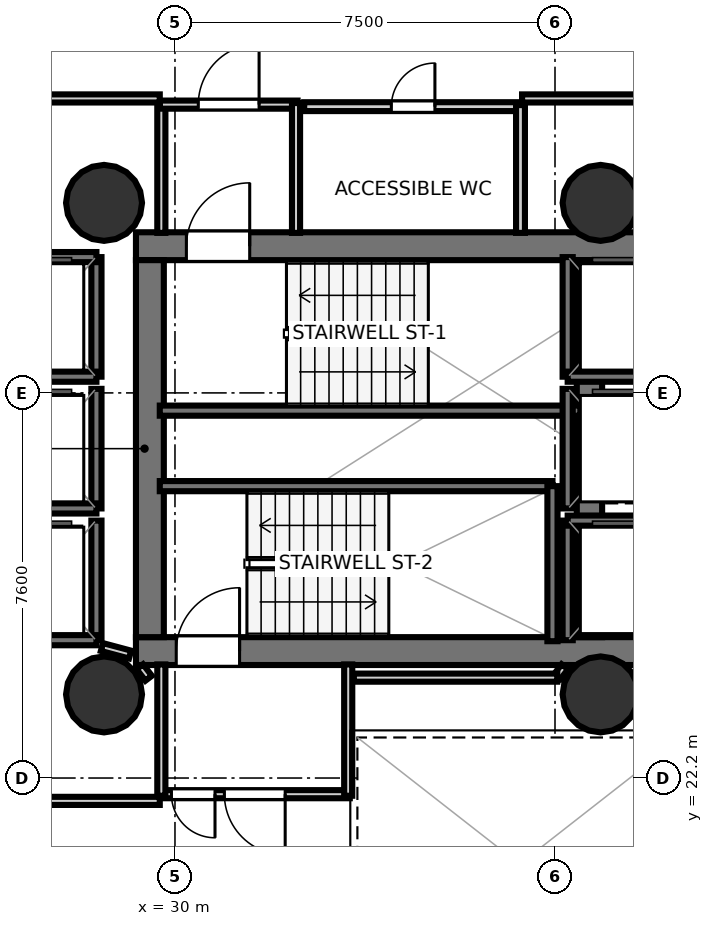
"""IFC4 building model, lengths in metres.
Left out: names, types, materials, properties, quantities, classifications, styles, units other than length and angle.
Written with IfcOpenShell. Run it as: python <this file> out.ifc"""

import sys

from ifc_helpers import new_model, si_unit, direction, frame, frame_2d, origin, origin_2d, place, context, subcontext, project, spatial, rectangle, hollow_circle, extrude, element, fill, save


model = new_model("IFC4")
c1 = context("Model", 3, precision=1e-05, world=origin(), true_north=direction((0.0, 1.0)))
c2 = subcontext(c1, "Body", "Model", "MODEL_VIEW")
j1 = project(units=[si_unit("LENGTHUNIT", "METRE"), si_unit("PLANEANGLEUNIT", "RADIAN")], contexts=[c1])
p1 = place(None, origin())
s1 = spatial("IfcSite", under=j1, at=p1, CompositionType="ELEMENT")
p2 = place(p1, origin())
s2 = spatial("IfcBuilding", under=s1, at=p2, CompositionType="ELEMENT")
p3 = place(p2, frame((0.0, 0.0, 97.8)))
s3 = spatial("IfcBuildingStorey", under=s2, at=p3, CompositionType="ELEMENT", Elevation=97.8)
p4 = place(p3, frame((29.23, 32.695, 0.0), z_axis=(0.0, 0.0, 1.0), x_axis=(1.0, 0.0, 0.0)))
e1 = element("IfcWall", 1, at=p4, inside=s3, PredefinedType="SHEAR", context=c2, shape_type="SweptSolid", body=[
    extrude(rectangle(XDim=10.62, YDim=0.55, at=frame_2d((5.31, 0.0))), origin(), (0.0, 0.0, 1.0), 3.52),
])
p5 = place(p4, frame((0.995, 0.0, 0.0)))
e2 = element("IfcOpeningElement", 2, at=p5, cuts=e1, PredefinedType="OPENING", context=c2, shape_type="SweptSolid", body=[
    extrude(rectangle(XDim=1.25, YDim=2.15, at=frame_2d((0.625, 1.075))), frame((0.0, 0.285, 0.0), z_axis=(0.0, -1.0, 0.0), x_axis=(1.0, 0.0, 0.0)), (0.0, 0.0, 1.0), 0.57),
])
p6 = place(p3, frame((29.23, 24.705, 0.0), z_axis=(0.0, 0.0, 1.0), x_axis=(1.0, 0.0, 0.0)))
e3 = element("IfcWall", 3, at=p6, inside=s3, PredefinedType="SHEAR", context=c2, shape_type="SweptSolid", body=[
    extrude(rectangle(XDim=10.62, YDim=0.55, at=frame_2d((5.31, 0.0))), origin(), (0.0, 0.0, 1.0), 3.52),
])
p7 = place(p6, frame((0.795, 0.0, 0.0)))
e4 = element("IfcOpeningElement", 4, at=p7, cuts=e3, PredefinedType="OPENING", context=c2, shape_type="SweptSolid", body=[
    extrude(rectangle(XDim=1.25, YDim=2.15, at=frame_2d((0.625, 1.075))), frame((0.0, 0.285, 0.0), z_axis=(0.0, -1.0, 0.0), x_axis=(1.0, 0.0, 0.0)), (0.0, 0.0, 1.0), 0.57),
])
p8 = place(p3, frame((29.505, 24.98, 0.0), z_axis=(0.0, 0.0, 1.0), x_axis=(0.0, 1.0, 0.0)))
e5 = element("IfcWall", 5, at=p8, inside=s3, PredefinedType="SHEAR", context=c2, shape_type="SweptSolid", body=[
    extrude(rectangle(XDim=7.44, YDim=0.55, at=frame_2d((3.72, 0.0))), origin(), (0.0, 0.0, 1.0), 3.52),
])
p9 = place(p3, frame((38.18, 24.98, 0.0), z_axis=(0.0, 0.0, 1.0), x_axis=(0.0, 1.0, 0.0)))
e6 = element("IfcWall", 6, at=p9, inside=s3, PredefinedType="SHEAR", context=c2, shape_type="SweptSolid", body=[
    extrude(rectangle(XDim=7.44, YDim=0.5, at=frame_2d((3.72, 0.0))), origin(), (0.0, 0.0, 1.0), 3.52),
])
for number, where, z_axis, x_axis in (
    (7, (28.6, 33.55, 0.0), (0.0, 0.0, 1.0), (1.0, 0.0, 0.0)),
    (8, (28.6, 23.85, 0.0), (0.0, 0.0, 1.0), (1.0, 0.0, 0.0)),
    (9, (38.4, 33.55, 0.0), (0.0, 0.0, 1.0), (1.0, 0.0, 0.0)),
    (10, (38.4, 23.85, 0.0), (0.0, 0.0, 1.0), (1.0, 0.0, 0.0)),
):
    element("IfcColumn", number, at=place(p3, frame(where, z_axis=z_axis, x_axis=x_axis)), inside=s3, PredefinedType="COLUMN", context=c2, shape_type="SweptSolid", body=[
        extrude(hollow_circle(Radius=0.75, WallThickness=0.036, at=origin_2d()), origin(), (0.0, 0.0, 1.0), 3.7),
    ])
p10 = place(p3, frame((29.7, 29.45, 0.0), z_axis=(0.0, 0.0, 1.0), x_axis=(1.0, 0.0, 0.0)))
e11 = element("IfcWall", 11, at=p10, inside=s3, PredefinedType="SOLIDWALL", context=c2, shape_type="SweptSolid", body=[
    extrude(rectangle(XDim=8.3, YDim=0.2, at=frame_2d((4.15, 0.0))), origin(), (0.0, 0.0, 1.0), 3.52),
])
p11 = place(p3, frame((29.7, 27.96, 0.0), z_axis=(0.0, 0.0, 1.0), x_axis=(1.0, 0.0, 0.0)))
e12 = element("IfcWall", 12, at=p11, inside=s3, PredefinedType="SOLIDWALL", context=c2, shape_type="SweptSolid", body=[
    extrude(rectangle(XDim=7.75, YDim=0.2, at=frame_2d((3.875, 0.0))), origin(), (0.0, 0.0, 1.0), 3.52),
])
p12 = place(p3, frame((37.45, 24.9, 0.0), z_axis=(0.0, 0.0, 1.0), x_axis=(0.0, 1.0, 0.0)))
e13 = element("IfcWall", 13, at=p12, inside=s3, PredefinedType="SOLIDWALL", context=c2, shape_type="SweptSolid", body=[
    extrude(rectangle(XDim=3.06, YDim=0.2, at=frame_2d((1.53, 0.0))), origin(), (0.0, 0.0, 1.0), 3.52),
])
p13 = place(p3, frame((37.75, 30.12, 0.0), z_axis=(0.0, 0.0, 1.0), x_axis=(0.0, 1.0, 0.0)))
e14 = element("IfcWall", 14, at=p13, inside=s3, PredefinedType="SOLIDWALL", context=c2, shape_type="SweptSolid", body=[
    extrude(rectangle(XDim=2.36, YDim=0.2, at=frame_2d((1.18, 0.0))), origin(), (0.0, 0.0, 1.0), 3.52),
])
p14 = place(p3, frame((37.75, 30.12, 0.0), z_axis=(0.0, 0.0, 1.0), x_axis=(1.0, 0.0, 0.0)))
e15 = element("IfcWall", 15, at=p14, inside=s3, PredefinedType="SOLIDWALL", context=c2, shape_type="SweptSolid", body=[
    extrude(rectangle(XDim=2.1, YDim=0.2, at=frame_2d((1.05, 0.0))), origin(), (0.0, 0.0, 1.0), 3.52),
])
p15 = place(p3, frame((37.75, 24.92, 0.0), z_axis=(0.0, 0.0, 1.0), x_axis=(0.0, 1.0, 0.0)))
e16 = element("IfcWall", 16, at=p15, inside=s3, PredefinedType="SOLIDWALL", context=c2, shape_type="SweptSolid", body=[
    extrude(rectangle(XDim=2.36, YDim=0.2, at=frame_2d((1.18, 0.0))), origin(), (0.0, 0.0, 1.0), 3.52),
])
p16 = place(p3, frame((37.75, 27.28, 0.0), z_axis=(0.0, 0.0, 1.0), x_axis=(1.0, 0.0, 0.0)))
e17 = element("IfcWall", 17, at=p16, inside=s3, PredefinedType="SOLIDWALL", context=c2, shape_type="SweptSolid", body=[
    extrude(rectangle(XDim=2.1, YDim=0.2, at=frame_2d((1.05, 0.0))), origin(), (0.0, 0.0, 1.0), 3.52),
])
p17 = place(p3, frame((28.45, 30.12, 0.0), z_axis=(0.0, 0.0, 1.0), x_axis=(0.0, 1.0, 0.0)))
e18 = element("IfcWall", 18, at=p17, inside=s3, PredefinedType="SOLIDWALL", context=c2, shape_type="SweptSolid", body=[
    extrude(rectangle(XDim=2.36, YDim=0.2, at=frame_2d((1.18, 0.0))), origin(), (0.0, 0.0, 1.0), 3.52),
])
for number, where, z_axis, x_axis in (
    (19, (26.35, 32.48, 0.0), (0.0, 0.0, 1.0), (1.0, 0.0, 0.0)),
    (20, (26.35, 30.12, 0.0), (0.0, 0.0, 1.0), (1.0, 0.0, 0.0)),
):
    element("IfcWall", number, at=place(p3, frame(where, z_axis=z_axis, x_axis=x_axis)), inside=s3, PredefinedType="SOLIDWALL", context=c2, shape_type="SweptSolid", body=[
        extrude(rectangle(XDim=2.1, YDim=0.2, at=frame_2d((1.05, 0.0))), origin(), (0.0, 0.0, 1.0), 3.52),
    ])
p18 = place(p3, frame((28.45, 27.52, 0.0), z_axis=(0.0, 0.0, 1.0), x_axis=(0.0, 1.0, 0.0)))
e21 = element("IfcWall", 21, at=p18, inside=s3, PredefinedType="SOLIDWALL", context=c2, shape_type="SweptSolid", body=[
    extrude(rectangle(XDim=2.36, YDim=0.2, at=frame_2d((1.18, 0.0))), origin(), (0.0, 0.0, 1.0), 3.52),
])
p19 = place(p3, frame((26.35, 27.52, 0.0), z_axis=(0.0, 0.0, 1.0), x_axis=(1.0, 0.0, 0.0)))
e22 = element("IfcWall", 22, at=p19, inside=s3, PredefinedType="SOLIDWALL", context=c2, shape_type="SweptSolid", body=[
    extrude(rectangle(XDim=2.1, YDim=0.2, at=frame_2d((1.05, 0.0))), origin(), (0.0, 0.0, 1.0), 3.52),
])
p20 = place(p3, frame((28.45, 24.92, 0.0), z_axis=(0.0, 0.0, 1.0), x_axis=(0.0, 1.0, 0.0)))
e23 = element("IfcWall", 23, at=p20, inside=s3, PredefinedType="SOLIDWALL", context=c2, shape_type="SweptSolid", body=[
    extrude(rectangle(XDim=2.36, YDim=0.2, at=frame_2d((1.18, 0.0))), origin(), (0.0, 0.0, 1.0), 3.52),
])
p21 = place(p3, frame((26.35, 24.92, 0.0), z_axis=(0.0, 0.0, 1.0), x_axis=(1.0, 0.0, 0.0)))
e24 = element("IfcWall", 24, at=p21, inside=s3, PredefinedType="SOLIDWALL", context=c2, shape_type="SweptSolid", body=[
    extrude(rectangle(XDim=2.1, YDim=0.2, at=frame_2d((1.05, 0.0))), origin(), (0.0, 0.0, 1.0), 3.52),
])
p22 = place(p3, frame((37.75, 27.52, 0.0), z_axis=(0.0, 0.0, 1.0), x_axis=(0.0, 1.0, 0.0)))
e25 = element("IfcWall", 25, at=p22, inside=s3, PredefinedType="SOLIDWALL", context=c2, shape_type="SweptSolid", body=[
    extrude(rectangle(XDim=2.36, YDim=0.2, at=frame_2d((1.18, 0.0))), origin(), (0.0, 0.0, 1.0), 3.52),
])
p23 = place(p3, frame((29.731, 32.958, 0.0), z_axis=(0.0, 0.0, 1.0), x_axis=(0.0, 1.0, 0.0)))
e26 = element("IfcWall", 26, at=p23, inside=s3, PredefinedType="PARTITIONING", context=c2, shape_type="SweptSolid", body=[
    extrude(rectangle(XDim=2.562, YDim=0.16, at=frame_2d((1.281, 0.0))), origin(), (0.0, 0.0, 1.0), 2.84),
])
p24 = place(p3, frame((29.7, 35.489, 0.0), z_axis=(0.0, 0.0, 1.0), x_axis=(1.0, 0.0, 0.0)))
e27 = element("IfcWall", 27, at=p24, inside=s3, PredefinedType="PARTITIONING", context=c2, shape_type="SweptSolid", body=[
    extrude(rectangle(XDim=2.72, YDim=0.16, at=frame_2d((1.36, 0.0))), origin(), (0.0, 0.0, 1.0), 2.84),
])
p25 = place(p24, frame((0.76, 0.0, 0.0)))
e28 = element("IfcOpeningElement", 28, at=p25, cuts=e27, PredefinedType="OPENING", context=c2, shape_type="SweptSolid", body=[
    extrude(rectangle(XDim=1.2, YDim=2.15, at=frame_2d((0.6, 1.075))), frame((0.0, 0.09, 0.0), z_axis=(0.0, -1.0, 0.0), x_axis=(1.0, 0.0, 0.0)), (0.0, 0.0, 1.0), 0.18),
])
p26 = place(p3, frame((32.389, 35.52, 0.0), z_axis=(0.0, 0.0, 1.0), x_axis=(0.0, -1.0, 0.0)))
e29 = element("IfcWall", 29, at=p26, inside=s3, PredefinedType="PARTITIONING", context=c2, shape_type="SweptSolid", body=[
    extrude(rectangle(XDim=2.562, YDim=0.16, at=frame_2d((1.281, 0.0))), origin(), (0.0, 0.0, 1.0), 2.84),
])
p27 = place(p3, frame((33.45, 21.881, 0.0), z_axis=(0.0, 0.0, 1.0), x_axis=(-1.0, 0.0, 0.0)))
e30 = element("IfcWall", 30, at=p27, inside=s3, PredefinedType="PARTITIONING", context=c2, shape_type="SweptSolid", body=[
    extrude(rectangle(XDim=3.75, YDim=0.16, at=frame_2d((1.875, 0.0))), origin(), (0.0, 0.0, 1.0), 2.84),
])
p28 = place(p27, frame((1.275, 0.0, 0.0)))
e31 = element("IfcOpeningElement", 31, at=p28, cuts=e30, PredefinedType="OPENING", context=c2, shape_type="SweptSolid", body=[
    extrude(rectangle(XDim=1.2, YDim=2.15, at=frame_2d((0.6, 1.075))), frame((0.0, 0.09, 0.0), z_axis=(0.0, -1.0, 0.0), x_axis=(1.0, 0.0, 0.0)), (0.0, 0.0, 1.0), 0.18),
])
p29 = place(p27, frame((2.66, 0.0, 0.0)))
e32 = element("IfcOpeningElement", 32, at=p29, cuts=e30, PredefinedType="OPENING", context=c2, shape_type="SweptSolid", body=[
    extrude(rectangle(XDim=0.86, YDim=2.05, at=frame_2d((0.43, 1.025))), frame((0.0, 0.09, 0.0), z_axis=(0.0, -1.0, 0.0), x_axis=(1.0, 0.0, 0.0)), (0.0, 0.0, 1.0), 0.18),
])
for number, where, z_axis, x_axis in (
    (33, (29.731, 21.85, 0.0), (0.0, 0.0, 1.0), (0.0, 1.0, 0.0)),
    (34, (33.419, 24.442, 0.0), (0.0, 0.0, 1.0), (0.0, -1.0, 0.0)),
):
    element("IfcWall", number, at=place(p3, frame(where, z_axis=z_axis, x_axis=x_axis)), inside=s3, PredefinedType="PARTITIONING", context=c2, shape_type="SweptSolid", body=[
        extrude(rectangle(XDim=2.592, YDim=0.16, at=frame_2d((1.296, 0.0))), origin(), (0.0, 0.0, 1.0), 2.84),
    ])
p30 = place(p3, frame((32.55, 35.449, 0.0), z_axis=(0.0, 0.0, 1.0), x_axis=(1.0, 0.0, 0.0)))
e35 = element("IfcWall", 35, at=p30, inside=s3, PredefinedType="PLUMBINGWALL", context=c2, shape_type="SweptSolid", body=[
    extrude(rectangle(XDim=4.3, YDim=0.175, at=frame_2d((2.15, 0.0))), origin(), (0.0, 0.0, 1.0), 2.84),
])
p31 = place(p30, frame((1.72, 0.0, 0.0)))
e36 = element("IfcOpeningElement", 36, at=p31, cuts=e35, PredefinedType="OPENING", context=c2, shape_type="SweptSolid", body=[
    extrude(rectangle(XDim=0.86, YDim=2.05, at=frame_2d((0.43, 1.025))), frame((0.0, 0.097, 0.0), z_axis=(0.0, -1.0, 0.0), x_axis=(1.0, 0.0, 0.0)), (0.0, 0.0, 1.0), 0.195),
])
p32 = place(p3, frame((36.819, 35.48, 0.0), z_axis=(0.0, 0.0, 1.0), x_axis=(0.0, -1.0, 0.0)))
e37 = element("IfcWall", 37, at=p32, inside=s3, PredefinedType="PLUMBINGWALL", context=c2, shape_type="SweptSolid", body=[
    extrude(rectangle(XDim=2.522, YDim=0.175, at=frame_2d((1.261, 0.0))), origin(), (0.0, 0.0, 1.0), 2.84),
])
p33 = place(p3, frame((29.48, 24.169, 0.0), z_axis=(0.0, 0.0, 1.0), x_axis=(-0.607608252226, 0.794236873878, 0.0)))
e38 = element("IfcWall", 38, at=p33, inside=s3, PredefinedType="PARTITIONING", context=c2, shape_type="SweptSolid", body=[
    extrude(rectangle(XDim=0.286, YDim=0.16, at=frame_2d((0.143, 0.0))), origin(), (0.0, 0.0, 1.0), 2.84),
])
p34 = place(p3, frame((29.114, 24.637, 0.0), z_axis=(0.0, 0.0, 1.0), x_axis=(-0.966199685486, 0.257794817183, 0.0)))
e39 = element("IfcWall", 39, at=p34, inside=s3, PredefinedType="PARTITIONING", context=c2, shape_type="SweptSolid", body=[
    extrude(rectangle(XDim=0.575, YDim=0.16, at=frame_2d((0.288, 0.0))), origin(), (0.0, 0.0, 1.0), 2.84),
])
p35 = place(p3, frame((37.694, 24.396, 0.0), z_axis=(0.0, 0.0, 1.0), x_axis=(-0.607118658061, -0.794611184815, 0.0)))
e40 = element("IfcWall", 40, at=p35, inside=s3, PredefinedType="PARTITIONING", context=c2, shape_type="SweptSolid", body=[
    extrude(rectangle(XDim=0.246, YDim=0.16, at=frame_2d((0.123, 0.0))), origin(), (0.0, 0.0, 1.0), 2.84),
])
p36 = place(p3, frame((37.545, 24.181, 0.0), z_axis=(0.0, 0.0, 1.0), x_axis=(-1.0, 0.0, 0.0)))
e41 = element("IfcWall", 41, at=p36, inside=s3, PredefinedType="PARTITIONING", context=c2, shape_type="SweptSolid", body=[
    extrude(rectangle(XDim=4.015, YDim=0.16, at=frame_2d((2.007, 0.0))), origin(), (0.0, 0.0, 1.0), 2.84),
])
p37 = place(p3, frame((39.818, 35.611, 0.0), z_axis=(0.0, 0.0, 1.0), x_axis=(-1.0, 0.0, 0.0)))
e42 = element("IfcWall", 42, at=p37, inside=s3, PredefinedType="PARTITIONING", context=c2, shape_type="SweptSolid", body=[
    extrude(rectangle(XDim=2.968, YDim=0.16, at=frame_2d((1.484, 0.0))), origin(), (0.0, 0.0, 1.0), 2.84),
])
for number, where, z_axis, x_axis in (
    (43, (29.7, 35.611, 0.0), (0.0, 0.0, 1.0), (-1.0, 0.0, 0.0)),
    (44, (26.42, 21.749, 0.0), (0.0, 0.0, 1.0), (1.0, 0.0, 0.0)),
):
    element("IfcWall", number, at=place(p3, frame(where, z_axis=z_axis, x_axis=x_axis)), inside=s3, PredefinedType="PARTITIONING", context=c2, shape_type="SweptSolid", body=[
        extrude(rectangle(XDim=3.28, YDim=0.16, at=frame_2d((1.64, 0.0))), origin(), (0.0, 0.0, 1.0), 2.84),
    ])
p38 = place(p5, origin())
e45 = element("IfcDoor", 45, at=p38, inside=s3, OperationType="SINGLE_SWING_RIGHT", PredefinedType="DOOR", context=c2, shape_type="SweptSolid", body=[
    extrude(rectangle(XDim=1.25, YDim=2.15, at=frame_2d((0.625, 1.075))), frame((0.0, 0.025, 0.0), z_axis=(0.0, -1.0, 0.0), x_axis=(1.0, 0.0, 0.0)), (0.0, 0.0, 1.0), 0.05),
])
fill(e2, e45)
p39 = place(p7, origin())
e46 = element("IfcDoor", 46, at=p39, inside=s3, OperationType="SINGLE_SWING_RIGHT", PredefinedType="DOOR", context=c2, shape_type="SweptSolid", body=[
    extrude(rectangle(XDim=1.25, YDim=2.15, at=frame_2d((0.625, 1.075))), frame((0.0, 0.025, 0.0), z_axis=(0.0, -1.0, 0.0), x_axis=(1.0, 0.0, 0.0)), (0.0, 0.0, 1.0), 0.05),
])
fill(e4, e46)
p40 = place(p25, origin())
e47 = element("IfcDoor", 47, at=p40, inside=s3, OperationType="SINGLE_SWING_RIGHT", PredefinedType="DOOR", context=c2, shape_type="SweptSolid", body=[
    extrude(rectangle(XDim=1.2, YDim=2.15, at=frame_2d((0.6, 1.075))), frame((0.0, 0.025, 0.0), z_axis=(0.0, -1.0, 0.0), x_axis=(1.0, 0.0, 0.0)), (0.0, 0.0, 1.0), 0.05),
])
fill(e28, e47)
p41 = place(p28, origin())
e48 = element("IfcDoor", 48, at=p41, inside=s3, OperationType="SINGLE_SWING_LEFT", PredefinedType="DOOR", context=c2, shape_type="SweptSolid", body=[
    extrude(rectangle(XDim=1.2, YDim=2.15, at=frame_2d((0.6, 1.075))), frame((0.0, 0.025, 0.0), z_axis=(0.0, -1.0, 0.0), x_axis=(1.0, 0.0, 0.0)), (0.0, 0.0, 1.0), 0.05),
])
fill(e31, e48)
p42 = place(p31, origin())
e49 = element("IfcDoor", 49, at=p42, inside=s3, OperationType="SINGLE_SWING_RIGHT", PredefinedType="DOOR", context=c2, shape_type="SweptSolid", body=[
    extrude(rectangle(XDim=0.86, YDim=2.05, at=frame_2d((0.43, 1.025))), frame((0.0, 0.025, 0.0), z_axis=(0.0, -1.0, 0.0), x_axis=(1.0, 0.0, 0.0)), (0.0, 0.0, 1.0), 0.05),
])
fill(e36, e49)
p43 = place(p29, origin())
e50 = element("IfcDoor", 50, at=p43, inside=s3, OperationType="SINGLE_SWING_LEFT", PredefinedType="DOOR", context=c2, shape_type="SweptSolid", body=[
    extrude(rectangle(XDim=0.86, YDim=2.05, at=frame_2d((0.43, 1.025))), frame((0.0, 0.025, 0.0), z_axis=(0.0, -1.0, 0.0), x_axis=(1.0, 0.0, 0.0)), (0.0, 0.0, 1.0), 0.05),
])
fill(e32, e50)
save(model, sys.argv[1])
